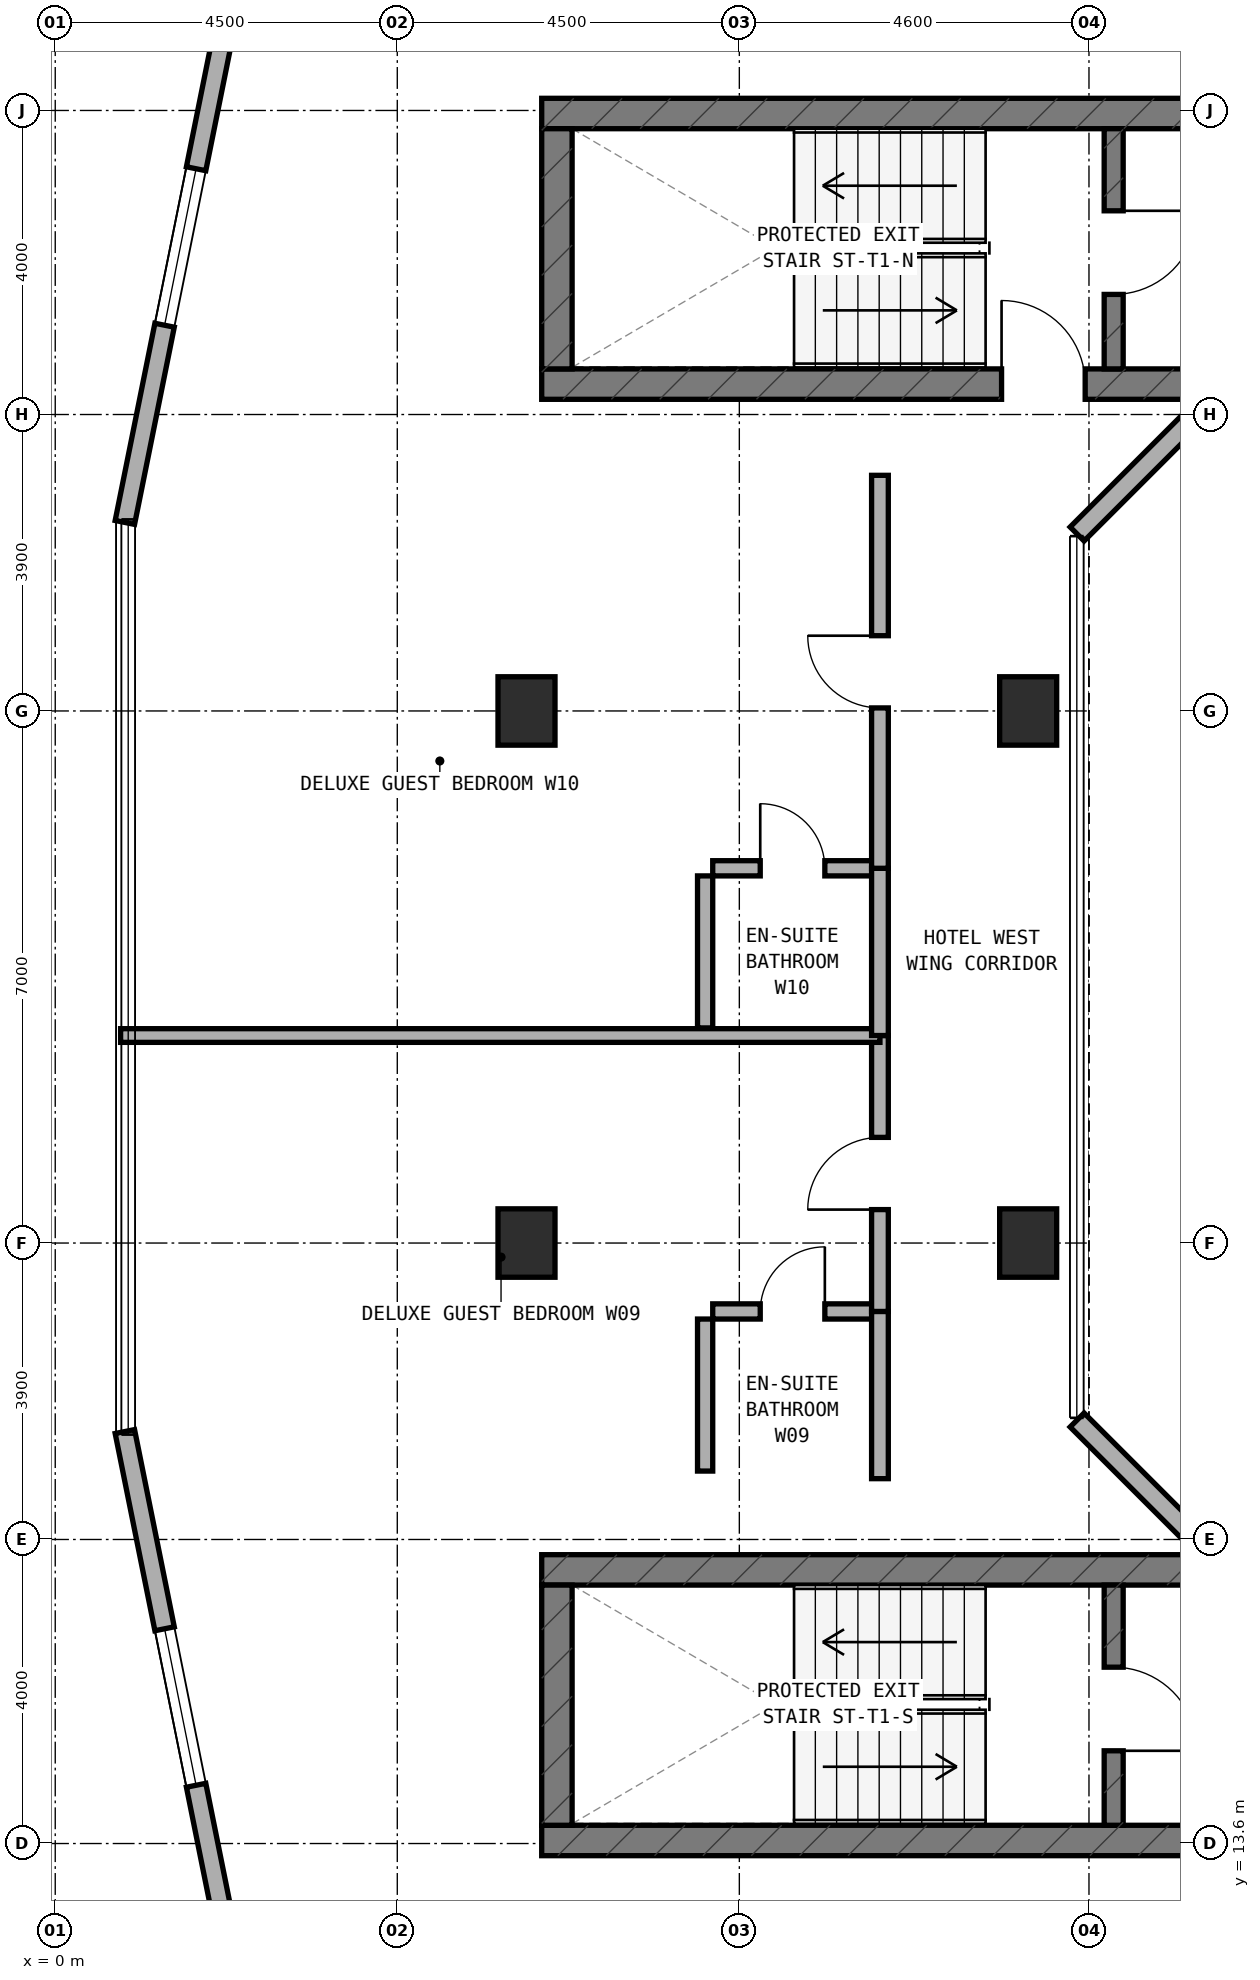
"""IFC4 building model, lengths in metres.
Left out: names, types, materials, properties, quantities, classifications, styles, units other than length and angle.
Written with IfcOpenShell. Run it as: python <this file> out.ifc"""

import sys

from ifc_helpers import new_model, si_unit, direction, frame, frame_2d, origin, origin_2d, place, context, subcontext, project, spatial, rectangle, extrude, element, fill, save


model = new_model("IFC4")
c1 = context("Model", 3, precision=1e-05, world=origin(), true_north=direction((0.0, 1.0)))
c2 = subcontext(c1, "Body", "Model", "MODEL_VIEW")
j1 = project(units=[si_unit("LENGTHUNIT", "METRE"), si_unit("PLANEANGLEUNIT", "RADIAN")], contexts=[c1])
p1 = place(None, origin())
s1 = spatial("IfcSite", under=j1, at=p1, CompositionType="ELEMENT")
p2 = place(p1, origin())
s2 = spatial("IfcBuilding", under=s1, at=p2, CompositionType="ELEMENT")
p3 = place(p2, frame((0.0, 0.0, 155.5)))
s3 = spatial("IfcBuildingStorey", under=s2, at=p3, CompositionType="ELEMENT", Elevation=155.5)
p4 = place(p3, frame((6.4, 32.8, 0.0), z_axis=(0.0, 0.0, 1.0), x_axis=(1.0, 0.0, 0.0)))
e1 = element("IfcWall", 1, at=p4, inside=s3, PredefinedType="SHEAR", context=c2, shape_type="SweptSolid", body=[
    extrude(rectangle(XDim=24.4, YDim=0.4, at=frame_2d((12.2, 0.0))), origin(), (0.0, 0.0, 1.0), 3.5),
])
p5 = place(p4, frame((6.05, 0.0, 0.0)))
e2 = element("IfcOpeningElement", 2, at=p5, cuts=e1, PredefinedType="OPENING", context=c2, shape_type="SweptSolid", body=[
    extrude(rectangle(XDim=1.1, YDim=2.15, at=frame_2d((0.55, 1.075))), frame((0.0, 0.21, 0.0), z_axis=(0.0, -1.0, 0.0), x_axis=(1.0, 0.0, 0.0)), (0.0, 0.0, 1.0), 0.42),
])
p6 = place(p3, frame((6.4, 36.36, 0.0), z_axis=(0.0, 0.0, 1.0), x_axis=(1.0, 0.0, 0.0)))
e3 = element("IfcWall", 3, at=p6, inside=s3, PredefinedType="SHEAR", context=c2, shape_type="SweptSolid", body=[
    extrude(rectangle(XDim=24.4, YDim=0.4, at=frame_2d((12.2, 0.0))), origin(), (0.0, 0.0, 1.0), 3.5),
])
p7 = place(p6, frame((9.15, 0.0, 0.0)))
e4 = element("IfcOpeningElement", 4, at=p7, cuts=e3, PredefinedType="OPENING", context=c2, shape_type="SweptSolid", body=[
    extrude(rectangle(XDim=1.2, YDim=2.15, at=frame_2d((0.6, 1.075))), frame((0.0, 0.21, 0.0), z_axis=(0.0, -1.0, 0.0), x_axis=(1.0, 0.0, 0.0)), (0.0, 0.0, 1.0), 0.42),
])
p8 = place(p6, frame((19.2, 0.0, 0.0)))
e5 = element("IfcOpeningElement", 5, at=p8, cuts=e3, PredefinedType="OPENING", context=c2, shape_type="SweptSolid", body=[
    extrude(rectangle(XDim=0.85, YDim=2.1, at=frame_2d((0.425, 1.05))), frame((0.0, 0.21, 0.0), z_axis=(0.0, -1.0, 0.0), x_axis=(1.0, 0.0, 0.0)), (0.0, 0.0, 1.0), 0.42),
])
p9 = place(p6, frame((16.94, 0.0, 0.0)))
e6 = element("IfcOpeningElement", 6, at=p9, cuts=e3, PredefinedType="OPENING", context=c2, shape_type="SweptSolid", body=[
    extrude(rectangle(XDim=0.85, YDim=2.1, at=frame_2d((0.425, 1.05))), frame((0.0, 0.21, 0.0), z_axis=(0.0, -1.0, 0.0), x_axis=(1.0, 0.0, 0.0)), (0.0, 0.0, 1.0), 0.42),
])
p10 = place(p3, frame((6.6, 33.0, 0.0), z_axis=(0.0, 0.0, 1.0), x_axis=(0.0, 1.0, 0.0)))
e7 = element("IfcWall", 7, at=p10, inside=s3, PredefinedType="SHEAR", context=c2, shape_type="SweptSolid", body=[
    extrude(rectangle(XDim=3.16, YDim=0.4, at=frame_2d((1.58, 0.0))), origin(), (0.0, 0.0, 1.0), 3.5),
])
p11 = place(p3, frame((13.925, 33.0, 0.0), z_axis=(0.0, 0.0, 1.0), x_axis=(0.0, 1.0, 0.0)))
e8 = element("IfcWall", 8, at=p11, inside=s3, PredefinedType="STANDARD", context=c2, shape_type="SweptSolid", body=[
    extrude(rectangle(XDim=3.16, YDim=0.25, at=frame_2d((1.58, 0.0))), origin(), (0.0, 0.0, 1.0), 3.22),
])
p12 = place(p11, frame((0.98, 0.0, 0.0)))
e9 = element("IfcOpeningElement", 9, at=p12, cuts=e8, PredefinedType="OPENING", context=c2, shape_type="SweptSolid", body=[
    extrude(rectangle(XDim=1.1, YDim=2.15, at=frame_2d((0.55, 1.075))), frame((0.0, 0.135, 0.0), z_axis=(0.0, -1.0, 0.0), x_axis=(1.0, 0.0, 0.0)), (0.0, 0.0, 1.0), 0.27),
])
p13 = place(p3, frame((6.4, 13.64, 0.0), z_axis=(0.0, 0.0, 1.0), x_axis=(1.0, 0.0, 0.0)))
e10 = element("IfcWall", 10, at=p13, inside=s3, PredefinedType="SHEAR", context=c2, shape_type="SweptSolid", body=[
    extrude(rectangle(XDim=24.4, YDim=0.4, at=frame_2d((12.2, 0.0))), origin(), (0.0, 0.0, 1.0), 3.5),
])
p14 = place(p13, frame((9.15, 0.0, 0.0)))
e11 = element("IfcOpeningElement", 11, at=p14, cuts=e10, PredefinedType="OPENING", context=c2, shape_type="SweptSolid", body=[
    extrude(rectangle(XDim=1.2, YDim=2.15, at=frame_2d((0.6, 1.075))), frame((0.0, 0.21, 0.0), z_axis=(0.0, -1.0, 0.0), x_axis=(1.0, 0.0, 0.0)), (0.0, 0.0, 1.0), 0.42),
])
p15 = place(p13, frame((16.94, 0.0, 0.0)))
e12 = element("IfcOpeningElement", 12, at=p15, cuts=e10, PredefinedType="OPENING", context=c2, shape_type="SweptSolid", body=[
    extrude(rectangle(XDim=0.85, YDim=2.1, at=frame_2d((0.425, 1.05))), frame((0.0, 0.21, 0.0), z_axis=(0.0, -1.0, 0.0), x_axis=(1.0, 0.0, 0.0)), (0.0, 0.0, 1.0), 0.42),
])
p16 = place(p13, frame((18.783, 0.0, 0.0)))
e13 = element("IfcOpeningElement", 13, at=p16, cuts=e10, PredefinedType="OPENING", context=c2, shape_type="SweptSolid", body=[
    extrude(rectangle(XDim=1.1, YDim=2.15, at=frame_2d((0.55, 1.075))), frame((0.0, 0.21, 0.0), z_axis=(0.0, -1.0, 0.0), x_axis=(1.0, 0.0, 0.0)), (0.0, 0.0, 1.0), 0.42),
])
p17 = place(p13, frame((20.65, 0.0, 0.0)))
e14 = element("IfcOpeningElement", 14, at=p17, cuts=e10, PredefinedType="OPENING", context=c2, shape_type="SweptSolid", body=[
    extrude(rectangle(XDim=1.1, YDim=2.15, at=frame_2d((0.55, 1.075))), frame((0.0, 0.21, 0.0), z_axis=(0.0, -1.0, 0.0), x_axis=(1.0, 0.0, 0.0)), (0.0, 0.0, 1.0), 0.42),
])
p18 = place(p13, frame((22.517, 0.0, 0.0)))
e15 = element("IfcOpeningElement", 15, at=p18, cuts=e10, PredefinedType="OPENING", context=c2, shape_type="SweptSolid", body=[
    extrude(rectangle(XDim=1.1, YDim=2.15, at=frame_2d((0.55, 1.075))), frame((0.0, 0.21, 0.0), z_axis=(0.0, -1.0, 0.0), x_axis=(1.0, 0.0, 0.0)), (0.0, 0.0, 1.0), 0.42),
])
p19 = place(p3, frame((6.4, 17.2, 0.0), z_axis=(0.0, 0.0, 1.0), x_axis=(1.0, 0.0, 0.0)))
e16 = element("IfcWall", 16, at=p19, inside=s3, PredefinedType="SHEAR", context=c2, shape_type="SweptSolid", body=[
    extrude(rectangle(XDim=24.4, YDim=0.4, at=frame_2d((12.2, 0.0))), origin(), (0.0, 0.0, 1.0), 3.5),
])
p20 = place(p3, frame((6.6, 13.84, 0.0), z_axis=(0.0, 0.0, 1.0), x_axis=(0.0, 1.0, 0.0)))
e17 = element("IfcWall", 17, at=p20, inside=s3, PredefinedType="SHEAR", context=c2, shape_type="SweptSolid", body=[
    extrude(rectangle(XDim=3.16, YDim=0.4, at=frame_2d((1.58, 0.0))), origin(), (0.0, 0.0, 1.0), 3.5),
])
p21 = place(p3, frame((13.925, 13.84, 0.0), z_axis=(0.0, 0.0, 1.0), x_axis=(0.0, 1.0, 0.0)))
e18 = element("IfcWall", 18, at=p21, inside=s3, PredefinedType="STANDARD", context=c2, shape_type="SweptSolid", body=[
    extrude(rectangle(XDim=3.16, YDim=0.25, at=frame_2d((1.58, 0.0))), origin(), (0.0, 0.0, 1.0), 3.22),
])
p22 = place(p21, frame((0.98, 0.0, 0.0)))
e19 = element("IfcOpeningElement", 19, at=p22, cuts=e18, PredefinedType="OPENING", context=c2, shape_type="SweptSolid", body=[
    extrude(rectangle(XDim=1.1, YDim=2.15, at=frame_2d((0.55, 1.075))), frame((0.0, 0.135, 0.0), z_axis=(0.0, -1.0, 0.0), x_axis=(1.0, 0.0, 0.0)), (0.0, 0.0, 1.0), 0.27),
])
for number, where, z_axis, x_axis in (
    (20, (6.2, 21.5, 0.0), (0.0, 0.0, 1.0), (1.0, 0.0, 0.0)),
    (21, (6.2, 28.5, 0.0), (0.0, 0.0, 1.0), (1.0, 0.0, 0.0)),
    (22, (12.8, 21.5, 0.0), (0.0, 0.0, 1.0), (1.0, 0.0, 0.0)),
    (23, (12.8, 28.5, 0.0), (0.0, 0.0, 1.0), (1.0, 0.0, 0.0)),
):
    element("IfcColumn", number, at=place(p3, frame(where, z_axis=z_axis, x_axis=x_axis)), inside=s3, PredefinedType="COLUMN", context=c2, shape_type="SweptSolid", body=[
        extrude(rectangle(XDim=0.75, YDim=0.9, at=origin_2d()), origin(), (0.0, 0.0, 1.0), 3.5),
    ])
p23 = place(p3, frame((2.729, 39.982, 0.0), z_axis=(0.0, 0.0, 1.0), x_axis=(-0.197435082048, -0.980315963543, 0.0)))
e24 = element("IfcWall", 24, at=p23, inside=s3, PredefinedType="STANDARD", context=c2, shape_type="SweptSolid", body=[
    extrude(rectangle(XDim=9.183, YDim=0.26, at=frame_2d((4.591, 0.0))), origin(), (0.0, 0.0, 1.0), 3.22),
])
p24 = place(p23, frame((4.436, 0.0, 0.85)))
e25 = element("IfcOpeningElement", 25, at=p24, cuts=e24, PredefinedType="OPENING", context=c2, shape_type="SweptSolid", body=[
    extrude(rectangle(XDim=2.1, YDim=1.5, at=frame_2d((1.05, 0.75))), frame((0.0, 0.14, 0.0), z_axis=(0.0, -1.0, 0.0), x_axis=(1.0, 0.0, 0.0)), (0.0, 0.0, 1.0), 0.28),
])
p25 = place(p3, frame((0.916, 19.02, 0.0), z_axis=(0.0, 0.0, 1.0), x_axis=(0.197435082048, -0.980315963543, 0.0)))
e26 = element("IfcWall", 26, at=p25, inside=s3, PredefinedType="STANDARD", context=c2, shape_type="SweptSolid", body=[
    extrude(rectangle(XDim=9.183, YDim=0.26, at=frame_2d((4.591, 0.0))), origin(), (0.0, 0.0, 1.0), 3.22),
])
p26 = place(p25, frame((2.647, 0.0, 0.85)))
e27 = element("IfcOpeningElement", 27, at=p26, cuts=e26, PredefinedType="OPENING", context=c2, shape_type="SweptSolid", body=[
    extrude(rectangle(XDim=2.1, YDim=1.5, at=frame_2d((1.05, 0.75))), frame((0.0, 0.14, 0.0), z_axis=(0.0, -1.0, 0.0), x_axis=(1.0, 0.0, 0.0)), (0.0, 0.0, 1.0), 0.28),
])
for number, where, z_axis, x_axis in (
    (28, (15.278, 32.662, 0.0), (0.0, 0.0, 1.0), (-0.707, -0.707, 0.0)),
    (29, (13.444, 19.172, 0.0), (0.0, 0.0, 1.0), (0.707, -0.707, 0.0)),
):
    element("IfcWall", number, at=place(p3, frame(where, z_axis=z_axis, x_axis=x_axis)), inside=s3, PredefinedType="STANDARD", context=c2, shape_type="SweptSolid", body=[
        extrude(rectangle(XDim=2.594, YDim=0.26, at=frame_2d((1.297, 0.0))), origin(), (0.0, 0.0, 1.0), 3.22),
    ])
p27 = place(p3, frame((8.65, 20.6, 0.0), z_axis=(0.0, 0.0, 1.0), x_axis=(1.0, 0.0, 0.0)))
e30 = element("IfcWall", 30, at=p27, inside=s3, PredefinedType="PLUMBINGWALL", context=c2, shape_type="SweptSolid", body=[
    extrude(rectangle(XDim=2.1, YDim=0.2, at=frame_2d((1.05, 0.0))), origin(), (0.0, 0.0, 1.0), 3.22),
])
p28 = place(p27, frame((0.625, 0.0, 0.0)))
e31 = element("IfcOpeningElement", 31, at=p28, cuts=e30, PredefinedType="OPENING", context=c2, shape_type="SweptSolid", body=[
    extrude(rectangle(XDim=0.85, YDim=2.1, at=frame_2d((0.425, 1.05))), frame((0.0, 0.11, 0.0), z_axis=(0.0, -1.0, 0.0), x_axis=(1.0, 0.0, 0.0)), (0.0, 0.0, 1.0), 0.22),
])
p29 = place(p3, frame((8.55, 18.5, 0.0), z_axis=(0.0, 0.0, 1.0), x_axis=(0.0, 1.0, 0.0)))
e32 = element("IfcWall", 32, at=p29, inside=s3, PredefinedType="PLUMBINGWALL", context=c2, shape_type="SweptSolid", body=[
    extrude(rectangle(XDim=2.0, YDim=0.2, at=frame_2d((1.0, 0.0))), origin(), (0.0, 0.0, 1.0), 3.22),
])
p30 = place(p3, frame((10.85, 18.4, 0.0), z_axis=(0.0, 0.0, 1.0), x_axis=(0.0, 1.0, 0.0)))
e33 = element("IfcWall", 33, at=p30, inside=s3, PredefinedType="SOLIDWALL", context=c2, shape_type="SweptSolid", body=[
    extrude(rectangle(XDim=2.2, YDim=0.22, at=frame_2d((1.1, 0.0))), origin(), (0.0, 0.0, 1.0), 3.22),
])
p31 = place(p3, frame((10.85, 20.6, 0.0), z_axis=(0.0, 0.0, 1.0), x_axis=(0.0, 1.0, 0.0)))
e34 = element("IfcWall", 34, at=p31, inside=s3, PredefinedType="SOLIDWALL", context=c2, shape_type="SweptSolid", body=[
    extrude(rectangle(XDim=3.63, YDim=0.22, at=frame_2d((1.815, 0.0))), origin(), (0.0, 0.0, 1.0), 2.795),
])
p32 = place(p31, frame((1.34, 0.0, 0.0)))
e35 = element("IfcOpeningElement", 35, at=p32, cuts=e34, PredefinedType="OPENING", context=c2, shape_type="SweptSolid", body=[
    extrude(rectangle(XDim=0.95, YDim=2.1, at=frame_2d((0.475, 1.05))), frame((0.0, 0.12, 0.0), z_axis=(0.0, -1.0, 0.0), x_axis=(1.0, 0.0, 0.0)), (0.0, 0.0, 1.0), 0.24),
])
p33 = place(p3, frame((0.86, 24.23, 0.0), z_axis=(0.0, 0.0, 1.0), x_axis=(1.0, 0.0, 0.0)))
e36 = element("IfcWall", 36, at=p33, inside=s3, PredefinedType="SOLIDWALL", context=c2, shape_type="SweptSolid", body=[
    extrude(rectangle(XDim=9.99, YDim=0.18, at=frame_2d((4.995, 0.0))), origin(), (0.0, 0.0, 1.0), 2.835),
])
p34 = place(p3, frame((8.65, 26.43, 0.0), z_axis=(0.0, 0.0, 1.0), x_axis=(1.0, 0.0, 0.0)))
e37 = element("IfcWall", 37, at=p34, inside=s3, PredefinedType="PLUMBINGWALL", context=c2, shape_type="SweptSolid", body=[
    extrude(rectangle(XDim=2.1, YDim=0.2, at=frame_2d((1.05, 0.0))), origin(), (0.0, 0.0, 1.0), 3.22),
])
p35 = place(p34, frame((0.625, 0.0, 0.0)))
e38 = element("IfcOpeningElement", 38, at=p35, cuts=e37, PredefinedType="OPENING", context=c2, shape_type="SweptSolid", body=[
    extrude(rectangle(XDim=0.85, YDim=2.1, at=frame_2d((0.425, 1.05))), frame((0.0, 0.11, 0.0), z_axis=(0.0, -1.0, 0.0), x_axis=(1.0, 0.0, 0.0)), (0.0, 0.0, 1.0), 0.22),
])
p36 = place(p3, frame((8.55, 24.33, 0.0), z_axis=(0.0, 0.0, 1.0), x_axis=(0.0, 1.0, 0.0)))
e39 = element("IfcWall", 39, at=p36, inside=s3, PredefinedType="PLUMBINGWALL", context=c2, shape_type="SweptSolid", body=[
    extrude(rectangle(XDim=2.0, YDim=0.2, at=frame_2d((1.0, 0.0))), origin(), (0.0, 0.0, 1.0), 3.22),
])
p37 = place(p3, frame((10.85, 24.23, 0.0), z_axis=(0.0, 0.0, 1.0), x_axis=(0.0, 1.0, 0.0)))
e40 = element("IfcWall", 40, at=p37, inside=s3, PredefinedType="SOLIDWALL", context=c2, shape_type="SweptSolid", body=[
    extrude(rectangle(XDim=2.2, YDim=0.22, at=frame_2d((1.1, 0.0))), origin(), (0.0, 0.0, 1.0), 3.22),
])
p38 = place(p3, frame((10.85, 26.43, 0.0), z_axis=(0.0, 0.0, 1.0), x_axis=(0.0, 1.0, 0.0)))
e41 = element("IfcWall", 41, at=p38, inside=s3, PredefinedType="SOLIDWALL", context=c2, shape_type="SweptSolid", body=[
    extrude(rectangle(XDim=5.17, YDim=0.22, at=frame_2d((2.585, 0.0))), origin(), (0.0, 0.0, 1.0), 2.795),
])
p39 = place(p38, frame((2.11, 0.0, 0.0)))
e42 = element("IfcOpeningElement", 42, at=p39, cuts=e41, PredefinedType="OPENING", context=c2, shape_type="SweptSolid", body=[
    extrude(rectangle(XDim=0.95, YDim=2.1, at=frame_2d((0.475, 1.05))), frame((0.0, 0.12, 0.0), z_axis=(0.0, -1.0, 0.0), x_axis=(1.0, 0.0, 0.0)), (0.0, 0.0, 1.0), 0.24),
])
p40 = place(p24, origin())
e43 = element("IfcWindow", 43, at=p40, inside=s3, PartitioningType="SINGLE_PANEL", PredefinedType="WINDOW", context=c2, shape_type="SweptSolid", body=[
    extrude(rectangle(XDim=2.1, YDim=1.5, at=frame_2d((1.05, 0.75))), frame((0.0, 0.03, 0.0), z_axis=(0.0, -1.0, 0.0), x_axis=(1.0, 0.0, 0.0)), (0.0, 0.0, 1.0), 0.06),
])
fill(e25, e43)
p41 = place(p26, origin())
e44 = element("IfcWindow", 44, at=p41, inside=s3, PartitioningType="SINGLE_PANEL", PredefinedType="WINDOW", context=c2, shape_type="SweptSolid", body=[
    extrude(rectangle(XDim=2.1, YDim=1.5, at=frame_2d((1.05, 0.75))), frame((0.0, 0.03, 0.0), z_axis=(0.0, -1.0, 0.0), x_axis=(1.0, 0.0, 0.0)), (0.0, 0.0, 1.0), 0.06),
])
fill(e27, e44)
p42 = place(p12, frame((1.1, 0.0, 0.0), z_axis=(0.0, 0.0, 1.0), x_axis=(-1.0, 0.0, 0.0)))
e45 = element("IfcDoor", 45, at=p42, inside=s3, OperationType="SINGLE_SWING_LEFT", PredefinedType="DOOR", context=c2, shape_type="SweptSolid", body=[
    extrude(rectangle(XDim=1.1, YDim=2.15, at=frame_2d((0.55, 1.075))), frame((0.0, 0.025, 0.0), z_axis=(0.0, -1.0, 0.0), x_axis=(1.0, 0.0, 0.0)), (0.0, 0.0, 1.0), 0.05),
])
fill(e9, e45)
p43 = place(p22, frame((1.1, 0.0, 0.0), z_axis=(0.0, 0.0, 1.0), x_axis=(-1.0, 0.0, 0.0)))
e46 = element("IfcDoor", 46, at=p43, inside=s3, OperationType="SINGLE_SWING_RIGHT", PredefinedType="DOOR", context=c2, shape_type="SweptSolid", body=[
    extrude(rectangle(XDim=1.1, YDim=2.15, at=frame_2d((0.55, 1.075))), frame((0.0, 0.025, 0.0), z_axis=(0.0, -1.0, 0.0), x_axis=(1.0, 0.0, 0.0)), (0.0, 0.0, 1.0), 0.05),
])
fill(e19, e46)
p44 = place(p5, origin())
e47 = element("IfcDoor", 47, at=p44, inside=s3, OperationType="SINGLE_SWING_LEFT", PredefinedType="DOOR", context=c2, shape_type="SweptSolid", body=[
    extrude(rectangle(XDim=1.1, YDim=2.15, at=frame_2d((0.55, 1.075))), frame((0.0, 0.025, 0.0), z_axis=(0.0, -1.0, 0.0), x_axis=(1.0, 0.0, 0.0)), (0.0, 0.0, 1.0), 0.05),
])
fill(e2, e47)
p45 = place(p28, origin())
e48 = element("IfcDoor", 48, at=p45, inside=s3, OperationType="SINGLE_SWING_RIGHT", PredefinedType="DOOR", context=c2, shape_type="SweptSolid", body=[
    extrude(rectangle(XDim=0.85, YDim=2.1, at=frame_2d((0.425, 1.05))), frame((0.0, 0.025, 0.0), z_axis=(0.0, -1.0, 0.0), x_axis=(1.0, 0.0, 0.0)), (0.0, 0.0, 1.0), 0.05),
])
fill(e31, e48)
p46 = place(p32, origin())
e49 = element("IfcDoor", 49, at=p46, inside=s3, OperationType="SINGLE_SWING_LEFT", PredefinedType="DOOR", context=c2, shape_type="SweptSolid", body=[
    extrude(rectangle(XDim=0.95, YDim=2.1, at=frame_2d((0.475, 1.05))), frame((0.0, 0.025, 0.0), z_axis=(0.0, -1.0, 0.0), x_axis=(1.0, 0.0, 0.0)), (0.0, 0.0, 1.0), 0.05),
])
fill(e35, e49)
p47 = place(p35, origin())
e50 = element("IfcDoor", 50, at=p47, inside=s3, OperationType="SINGLE_SWING_LEFT", PredefinedType="DOOR", context=c2, shape_type="SweptSolid", body=[
    extrude(rectangle(XDim=0.85, YDim=2.1, at=frame_2d((0.425, 1.05))), frame((0.0, 0.025, 0.0), z_axis=(0.0, -1.0, 0.0), x_axis=(1.0, 0.0, 0.0)), (0.0, 0.0, 1.0), 0.05),
])
fill(e38, e50)
p48 = place(p39, origin())
e51 = element("IfcDoor", 51, at=p48, inside=s3, OperationType="SINGLE_SWING_RIGHT", PredefinedType="DOOR", context=c2, shape_type="SweptSolid", body=[
    extrude(rectangle(XDim=0.95, YDim=2.1, at=frame_2d((0.475, 1.05))), frame((0.0, 0.025, 0.0), z_axis=(0.0, -1.0, 0.0), x_axis=(1.0, 0.0, 0.0)), (0.0, 0.0, 1.0), 0.05),
])
fill(e42, e51)
save(model, sys.argv[1])
